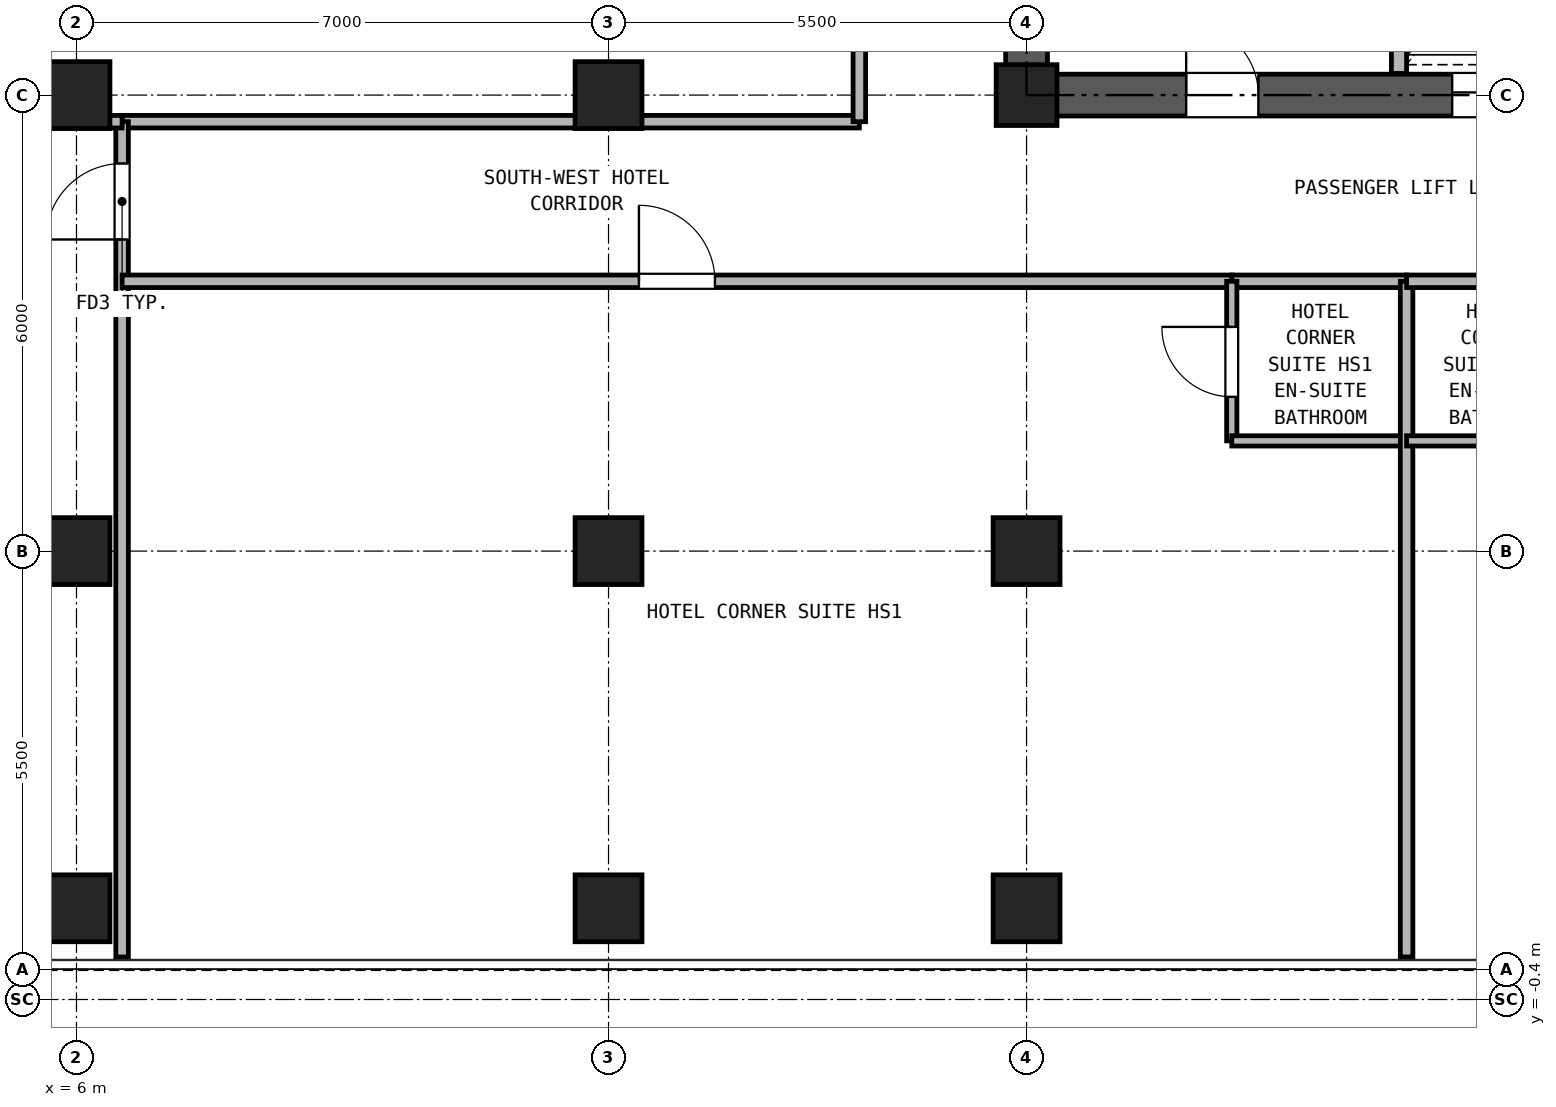
"""IFC4 building model, lengths in metres.
Left out: names, types, materials, properties, quantities, classifications, styles, units other than length and angle.
Written with IfcOpenShell. Run it as: python <this file> out.ifc"""

import sys

from ifc_helpers import new_model, si_unit, direction, frame, frame_2d, origin, origin_2d, place, context, subcontext, project, spatial, rectangle, hollow_rectangle, extrude, source, transform, mapped, element, fill, save


model = new_model("IFC4")
c1 = context("Model", 3, precision=1e-05, world=origin(), true_north=direction((0.0, 1.0)))
c2 = subcontext(c1, "Body", "Model", "MODEL_VIEW")
j1 = project(units=[si_unit("LENGTHUNIT", "METRE"), si_unit("PLANEANGLEUNIT", "RADIAN")], contexts=[c1])
p1 = place(None, origin())
s1 = spatial("IfcSite", under=j1, at=p1, CompositionType="ELEMENT")
p2 = place(p1, origin())
s2 = spatial("IfcBuilding", under=s1, at=p2, CompositionType="ELEMENT")
p3 = place(p2, frame((0.0, 0.0, 134.3)))
s3 = spatial("IfcBuildingStorey", under=s2, at=p3, CompositionType="ELEMENT", Elevation=134.3)
m1 = source(origin(), c2, "Body", "SweptSolid", [
    extrude(hollow_rectangle(XDim=0.88, YDim=0.88, WallThickness=0.05, at=origin_2d()), origin(), (0.0, 0.0, 1.0), 2.95),
])
for number, where, z_axis, x_axis in (
    (1, (6.0, 0.8, 0.0), (0.0, 0.0, 1.0), (1.0, 0.0, 0.0)),
    (2, (13.0, 0.8, 0.0), (0.0, 0.0, 1.0), (1.0, 0.0, 0.0)),
    (3, (18.5, 0.8, 0.0), (0.0, 0.0, 1.0), (1.0, 0.0, 0.0)),
    (4, (6.0, 5.5, 0.0), (0.0, 0.0, 1.0), (1.0, 0.0, 0.0)),
    (5, (6.0, 11.5, 0.0), (0.0, 0.0, 1.0), (1.0, 0.0, 0.0)),
    (6, (13.0, 5.5, 0.0), (0.0, 0.0, 1.0), (1.0, 0.0, 0.0)),
    (7, (13.0, 11.5, 0.0), (0.0, 0.0, 1.0), (1.0, 0.0, 0.0)),
    (8, (18.5, 5.5, 0.0), (0.0, 0.0, 1.0), (1.0, 0.0, 0.0)),
):
    element("IfcColumn", number, at=place(p3, frame(where, z_axis=z_axis, x_axis=x_axis)), inside=s3, PredefinedType="COLUMN", context=c2, shape_type="MappedRepresentation", body=[
        mapped(m1, transform((0.0, 0.0, 0.0), x_axis=(1.0, 0.0, 0.0), y_axis=(0.0, 1.0, 0.0), z_axis=(0.0, 0.0, 1.0), scale=1.0)),
    ])
m2 = source(origin(), c2, "Body", "SweptSolid", [
    extrude(hollow_rectangle(XDim=0.8, YDim=0.8, WallThickness=0.045, at=origin_2d()), origin(), (0.0, 0.0, 1.0), 2.95),
])
p4 = place(p3, frame((18.5, 11.5, 0.0), z_axis=(0.0, 0.0, 1.0), x_axis=(1.0, 0.0, 0.0)))
e9 = element("IfcColumn", 9, at=p4, inside=s3, PredefinedType="COLUMN", context=c2, shape_type="MappedRepresentation", body=[
    mapped(m2, transform((0.0, 0.0, 0.0), x_axis=(1.0, 0.0, 0.0), y_axis=(0.0, 1.0, 0.0), z_axis=(0.0, 0.0, 1.0), scale=1.0)),
])
p5 = place(p3, frame((18.225, 11.5, 0.0), z_axis=(0.0, 0.0, 1.0), x_axis=(1.0, 0.0, 0.0)))
e10 = element("IfcWall", 10, at=p5, inside=s3, PredefinedType="SHEAR", context=c2, shape_type="SweptSolid", body=[
    extrude(rectangle(XDim=10.55, YDim=0.55, at=frame_2d((5.275, 0.0))), origin(), (0.0, 0.0, 1.0), 2.95),
])
p6 = place(p5, frame((2.375, 0.0, 0.0)))
e11 = element("IfcOpeningElement", 11, at=p6, cuts=e10, PredefinedType="OPENING", context=c2, shape_type="SweptSolid", body=[
    extrude(rectangle(XDim=0.95, YDim=2.15, at=frame_2d((0.475, 1.075))), frame((0.0, 0.285, 0.0), z_axis=(0.0, -1.0, 0.0), x_axis=(1.0, 0.0, 0.0)), (0.0, 0.0, 1.0), 0.57),
])
p7 = place(p5, frame((5.875, 0.0, 0.0)))
e12 = element("IfcOpeningElement", 12, at=p7, cuts=e10, PredefinedType="OPENING", context=c2, shape_type="SweptSolid", body=[
    extrude(rectangle(XDim=1.1, YDim=2.25, at=frame_2d((0.55, 1.125))), frame((0.0, 0.285, 0.0), z_axis=(0.0, -1.0, 0.0), x_axis=(1.0, 0.0, 0.0)), (0.0, 0.0, 1.0), 0.57),
])
p8 = place(p5, frame((8.275, 0.0, 0.0)))
e13 = element("IfcOpeningElement", 13, at=p8, cuts=e10, PredefinedType="OPENING", context=c2, shape_type="SweptSolid", body=[
    extrude(rectangle(XDim=1.1, YDim=2.25, at=frame_2d((0.55, 1.125))), frame((0.0, 0.285, 0.0), z_axis=(0.0, -1.0, 0.0), x_axis=(1.0, 0.0, 0.0)), (0.0, 0.0, 1.0), 0.57),
])
p9 = place(p3, frame((18.5, 11.775, 0.0), z_axis=(0.0, 0.0, 1.0), x_axis=(0.0, 1.0, 0.0)))
e14 = element("IfcWall", 14, at=p9, inside=s3, PredefinedType="SHEAR", context=c2, shape_type="SweptSolid", body=[
    extrude(rectangle(XDim=16.7, YDim=0.55, at=frame_2d((8.35, 0.0))), origin(), (0.0, 0.0, 1.0), 2.95),
])
p10 = place(p9, frame((7.375, 0.0, 0.0)))
e15 = element("IfcOpeningElement", 15, at=p10, cuts=e14, PredefinedType="OPENING", context=c2, shape_type="SweptSolid", body=[
    extrude(rectangle(XDim=1.15, YDim=2.2, at=frame_2d((0.575, 1.1))), frame((0.0, 0.285, 0.0), z_axis=(0.0, -1.0, 0.0), x_axis=(1.0, 0.0, 0.0)), (0.0, 0.0, 1.0), 0.57),
])
p11 = place(p3, frame((23.4, 11.785, 0.0), z_axis=(0.0, 0.0, 1.0), x_axis=(0.0, 1.0, 0.0)))
e16 = element("IfcWall", 16, at=p11, inside=s3, PredefinedType="PARTITIONING", context=c2, shape_type="SweptSolid", body=[
    extrude(rectangle(XDim=3.215, YDim=0.2, at=frame_2d((1.607, 0.0))), origin(), (0.0, 0.0, 1.0), 2.95),
])
p12 = place(p3, frame((6.6, 11.15, 0.0), z_axis=(0.0, 0.0, 1.0), x_axis=(1.0, 0.0, 0.0)))
e17 = element("IfcWall", 17, at=p12, inside=s3, PredefinedType="PARTITIONING", context=c2, shape_type="SweptSolid", body=[
    extrude(rectangle(XDim=9.7, YDim=0.165, at=frame_2d((4.85, 0.0))), origin(), (0.0, 0.0, 1.0), 2.95),
])
p13 = place(p3, frame((16.3, 11.15, 0.0), z_axis=(0.0, 0.0, 1.0), x_axis=(0.0, 1.0, 0.0)))
e18 = element("IfcWall", 18, at=p13, inside=s3, PredefinedType="PARTITIONING", context=c2, shape_type="SweptSolid", body=[
    extrude(rectangle(XDim=18.7, YDim=0.165, at=frame_2d((9.35, 0.0))), origin(), (0.0, 0.0, 1.0), 2.95),
])
p14 = place(p13, frame((2.75, 0.0, 0.0)))
e19 = element("IfcOpeningElement", 19, at=p14, cuts=e18, PredefinedType="OPENING", context=c2, shape_type="SweptSolid", body=[
    extrude(rectangle(XDim=0.95, YDim=2.15, at=frame_2d((0.475, 1.075))), frame((0.0, 0.093, 0.0), z_axis=(0.0, -1.0, 0.0), x_axis=(1.0, 0.0, 0.0)), (0.0, 0.0, 1.0), 0.185),
])
p15 = place(p13, frame((12.1, 0.0, 0.0)))
e20 = element("IfcOpeningElement", 20, at=p15, cuts=e18, PredefinedType="OPENING", context=c2, shape_type="SweptSolid", body=[
    extrude(rectangle(XDim=0.95, YDim=2.15, at=frame_2d((0.475, 1.075))), frame((0.0, 0.093, 0.0), z_axis=(0.0, -1.0, 0.0), x_axis=(1.0, 0.0, 0.0)), (0.0, 0.0, 1.0), 0.185),
])
p16 = place(p3, frame((6.6, 0.16, 0.0), z_axis=(0.0, 0.0, 1.0), x_axis=(0.0, 1.0, 0.0)))
e21 = element("IfcWall", 21, at=p16, inside=s3, PredefinedType="PARTITIONING", context=c2, shape_type="SweptSolid", body=[
    extrude(rectangle(XDim=10.99, YDim=0.165, at=frame_2d((5.495, 0.0))), origin(), (0.0, 0.0, 1.0), 2.95),
])
p17 = place(p16, frame((9.44, 0.0, 0.0)))
e22 = element("IfcOpeningElement", 22, at=p17, cuts=e21, PredefinedType="OPENING", context=c2, shape_type="SweptSolid", body=[
    extrude(rectangle(XDim=1.0, YDim=2.15, at=frame_2d((0.5, 1.075))), frame((0.0, 0.093, 0.0), z_axis=(0.0, -1.0, 0.0), x_axis=(1.0, 0.0, 0.0)), (0.0, 0.0, 1.0), 0.185),
])
p18 = place(p3, frame((0.16, 11.15, 0.0), z_axis=(0.0, 0.0, 1.0), x_axis=(1.0, 0.0, 0.0)))
e23 = element("IfcWall", 23, at=p18, inside=s3, PredefinedType="PARTITIONING", context=c2, shape_type="SweptSolid", body=[
    extrude(rectangle(XDim=6.44, YDim=0.165, at=frame_2d((3.22, 0.0))), origin(), (0.0, 0.0, 1.0), 2.95),
])
p19 = place(p3, frame((21.2, 9.05, 0.0), z_axis=(0.0, 0.0, 1.0), x_axis=(1.0, 0.0, 0.0)))
e24 = element("IfcWall", 24, at=p19, inside=s3, PredefinedType="PARTITIONING", context=c2, shape_type="SweptSolid", body=[
    extrude(rectangle(XDim=2.3, YDim=0.165, at=frame_2d((1.15, 0.0))), origin(), (0.0, 0.0, 1.0), 2.95),
])
p20 = place(p3, frame((6.6, 9.05, 0.0), z_axis=(0.0, 0.0, 1.0), x_axis=(1.0, 0.0, 0.0)))
e25 = element("IfcWall", 25, at=p20, inside=s3, PredefinedType="PARTITIONING", context=c2, shape_type="SweptSolid", body=[
    extrude(rectangle(XDim=14.6, YDim=0.165, at=frame_2d((7.3, 0.0))), origin(), (0.0, 0.0, 1.0), 2.95),
])
p21 = place(p20, frame((6.8, 0.0, 0.0)))
e26 = element("IfcOpeningElement", 26, at=p21, cuts=e25, PredefinedType="OPENING", context=c2, shape_type="SweptSolid", body=[
    extrude(rectangle(XDim=1.0, YDim=2.15, at=frame_2d((0.5, 1.075))), frame((0.0, 0.093, 0.0), z_axis=(0.0, -1.0, 0.0), x_axis=(1.0, 0.0, 0.0)), (0.0, 0.0, 1.0), 0.185),
])
p22 = place(p3, frame((21.2, 6.95, 0.0), z_axis=(0.0, 0.0, 1.0), x_axis=(0.0, 1.0, 0.0)))
e27 = element("IfcWall", 27, at=p22, inside=s3, PredefinedType="PARTITIONING", context=c2, shape_type="SweptSolid", body=[
    extrude(rectangle(XDim=2.1, YDim=0.135, at=frame_2d((1.05, 0.0))), origin(), (0.0, 0.0, 1.0), 2.95),
])
p23 = place(p22, frame((0.58, 0.0, 0.0)))
e28 = element("IfcOpeningElement", 28, at=p23, cuts=e27, PredefinedType="OPENING", context=c2, shape_type="SweptSolid", body=[
    extrude(rectangle(XDim=0.92, YDim=2.1, at=frame_2d((0.46, 1.05))), frame((0.0, 0.077, 0.0), z_axis=(0.0, -1.0, 0.0), x_axis=(1.0, 0.0, 0.0)), (0.0, 0.0, 1.0), 0.155),
])
p24 = place(p3, frame((21.2, 6.95, 0.0), z_axis=(0.0, 0.0, 1.0), x_axis=(1.0, 0.0, 0.0)))
e29 = element("IfcWall", 29, at=p24, inside=s3, PredefinedType="PARTITIONING", context=c2, shape_type="SweptSolid", body=[
    extrude(rectangle(XDim=2.3, YDim=0.135, at=frame_2d((1.15, 0.0))), origin(), (0.0, 0.0, 1.0), 2.95),
])
p25 = place(p3, frame((23.5, 0.16, 0.0), z_axis=(0.0, 0.0, 1.0), x_axis=(0.0, 1.0, 0.0)))
e30 = element("IfcWall", 30, at=p25, inside=s3, PredefinedType="PARTITIONING", context=c2, shape_type="SweptSolid", body=[
    extrude(rectangle(XDim=8.89, YDim=0.165, at=frame_2d((4.445, 0.0))), origin(), (0.0, 0.0, 1.0), 2.95),
])
p26 = place(p3, frame((23.5, 9.05, 0.0), z_axis=(0.0, 0.0, 1.0), x_axis=(1.0, 0.0, 0.0)))
e31 = element("IfcWall", 31, at=p26, inside=s3, PredefinedType="PARTITIONING", context=c2, shape_type="SweptSolid", body=[
    extrude(rectangle(XDim=2.3, YDim=0.165, at=frame_2d((1.15, 0.0))), origin(), (0.0, 0.0, 1.0), 2.95),
])
p27 = place(p3, frame((23.5, 6.95, 0.0), z_axis=(0.0, 0.0, 1.0), x_axis=(1.0, 0.0, 0.0)))
e32 = element("IfcWall", 32, at=p27, inside=s3, PredefinedType="PARTITIONING", context=c2, shape_type="SweptSolid", body=[
    extrude(rectangle(XDim=2.3, YDim=0.135, at=frame_2d((1.15, 0.0))), origin(), (0.0, 0.0, 1.0), 2.95),
])
p28 = place(p6, frame((0.95, 0.0, 0.0), z_axis=(0.0, 0.0, 1.0), x_axis=(-1.0, 0.0, 0.0)))
e33 = element("IfcDoor", 33, at=p28, inside=s3, OperationType="SINGLE_SWING_LEFT", PredefinedType="DOOR", context=c2, shape_type="SweptSolid", body=[
    extrude(rectangle(XDim=0.95, YDim=2.15, at=frame_2d((0.475, 1.075))), frame((0.0, 0.025, 0.0), z_axis=(0.0, -1.0, 0.0), x_axis=(1.0, 0.0, 0.0)), (0.0, 0.0, 1.0), 0.05),
])
fill(e11, e33)
p29 = place(p7, frame((1.1, 0.0, 0.0), z_axis=(0.0, 0.0, 1.0), x_axis=(-1.0, 0.0, 0.0)))
e34 = element("IfcDoor", 34, at=p29, inside=s3, OperationType="DOUBLE_DOOR_SLIDING", PredefinedType="DOOR", context=c2, shape_type="SweptSolid", body=[
    extrude(rectangle(XDim=1.1, YDim=2.25, at=frame_2d((0.55, 1.125))), frame((0.0, 0.025, 0.0), z_axis=(0.0, -1.0, 0.0), x_axis=(1.0, 0.0, 0.0)), (0.0, 0.0, 1.0), 0.05),
])
fill(e12, e34)
p30 = place(p17, origin())
e35 = element("IfcDoor", 35, at=p30, inside=s3, OperationType="SINGLE_SWING_LEFT", PredefinedType="DOOR", context=c2, shape_type="SweptSolid", body=[
    extrude(rectangle(XDim=1.0, YDim=2.15, at=frame_2d((0.5, 1.075))), frame((0.0, 0.025, 0.0), z_axis=(0.0, -1.0, 0.0), x_axis=(1.0, 0.0, 0.0)), (0.0, 0.0, 1.0), 0.05),
])
fill(e22, e35)
p31 = place(p23, origin())
e36 = element("IfcDoor", 36, at=p31, inside=s3, OperationType="SINGLE_SWING_RIGHT", PredefinedType="DOOR", context=c2, shape_type="SweptSolid", body=[
    extrude(rectangle(XDim=0.92, YDim=2.1, at=frame_2d((0.46, 1.05))), frame((0.0, 0.025, 0.0), z_axis=(0.0, -1.0, 0.0), x_axis=(1.0, 0.0, 0.0)), (0.0, 0.0, 1.0), 0.05),
])
fill(e28, e36)
p32 = place(p21, frame((1.0, 0.0, 0.0), z_axis=(0.0, 0.0, 1.0), x_axis=(-1.0, 0.0, 0.0)))
e37 = element("IfcDoor", 37, at=p32, inside=s3, OperationType="SINGLE_SWING_LEFT", PredefinedType="DOOR", context=c2, shape_type="SweptSolid", body=[
    extrude(rectangle(XDim=1.0, YDim=2.15, at=frame_2d((0.5, 1.075))), frame((0.0, 0.025, 0.0), z_axis=(0.0, -1.0, 0.0), x_axis=(1.0, 0.0, 0.0)), (0.0, 0.0, 1.0), 0.05),
])
fill(e26, e37)
save(model, sys.argv[1])
